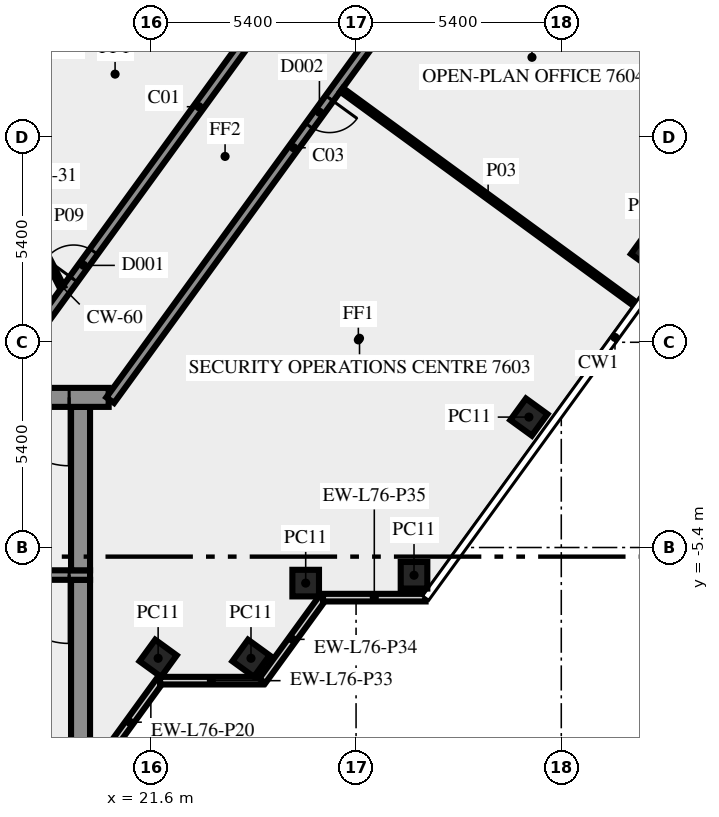
"""IFC4 building model, lengths in metres.
Left out: names, types, materials, properties, quantities, classifications, styles, units other than length and angle.
Written with IfcOpenShell. Run it as: python <this file> out.ifc"""

import sys

from ifc_helpers import new_model, si_unit, direction, frame, frame_2d, origin, origin_2d, place, context, subcontext, project, spatial, rectangle, extrude, element, fill, save


model = new_model("IFC4")
c1 = context("Model", 3, precision=1e-05, world=origin(), true_north=direction((0.0, 1.0)))
c2 = subcontext(c1, "Body", "Model", "MODEL_VIEW")
j1 = project(units=[si_unit("LENGTHUNIT", "METRE"), si_unit("PLANEANGLEUNIT", "RADIAN")], contexts=[c1])
p1 = place(None, origin())
s1 = spatial("IfcSite", under=j1, at=p1, CompositionType="ELEMENT")
p2 = place(p1, origin())
s2 = spatial("IfcBuilding", under=s1, at=p2, CompositionType="ELEMENT")
p3 = place(p2, frame((0.0, 0.0, 327.0)))
s3 = spatial("IfcBuildingStorey", under=s2, at=p3, CompositionType="ELEMENT", Elevation=327.0)
for number, where, z_axis, x_axis in (
    (1, (21.792, -8.315, 0.0), (0.0, 0.0, 1.0), (0.588, 0.809, 0.0)),
    (2, (24.235, -8.315, 0.0), (0.0, 0.0, 1.0), (0.588, 0.809, 0.0)),
    (3, (25.674, -6.337, 0.0), (0.0, 0.0, 1.0), (1.0, 0.0, 0.0)),
    (4, (28.525, -6.13, 0.0), (0.0, 0.0, 1.0), (1.0, 0.0, 0.0)),
    (5, (31.548, -1.969, 0.0), (0.0, 0.0, 1.0), (0.588, 0.809, 0.0)),
    (6, (34.722, 2.4, 0.0), (0.0, 0.0, 1.0), (0.588, 0.809, 0.0)),
):
    element("IfcColumn", number, at=place(p3, frame(where, z_axis=z_axis, x_axis=x_axis)), inside=s3, PredefinedType="COLUMN", context=c2, shape_type="SweptSolid", body=[
        extrude(rectangle(XDim=0.7, YDim=0.7, at=origin_2d()), origin(), (0.0, 0.0, 1.0), 3.65),
    ])
p4 = place(p3, frame((20.253, -11.083, 0.0), z_axis=(0.0, 0.0, 1.0), x_axis=(0.587766567315, 0.809030569476, 0.0)))
e7 = element("IfcWall", 7, at=p4, inside=s3, PredefinedType="SOLIDWALL", context=c2, shape_type="SweptSolid", body=[
    extrude(rectangle(XDim=2.688, YDim=0.2, at=frame_2d((1.344, 0.0))), origin(), (0.0, 0.0, 1.0), 3.65),
])
p5 = place(p3, frame((21.843, -8.904, 0.0), z_axis=(0.0, 0.0, 1.0), x_axis=(1.0, 0.0, 0.0)))
e8 = element("IfcWall", 8, at=p5, inside=s3, PredefinedType="SOLIDWALL", context=c2, shape_type="SweptSolid", body=[
    extrude(rectangle(XDim=2.7, YDim=0.2, at=frame_2d((1.35, 0.0))), origin(), (0.0, 0.0, 1.0), 3.65),
])
p6 = place(p3, frame((24.533, -8.909, 0.0), z_axis=(0.0, 0.0, 1.0), x_axis=(0.587720002413, 0.809064397168, 0.0)))
e9 = element("IfcWall", 9, at=p6, inside=s3, PredefinedType="SOLIDWALL", context=c2, shape_type="SweptSolid", body=[
    extrude(rectangle(XDim=2.7, YDim=0.2, at=frame_2d((1.35, 0.0))), origin(), (0.0, 0.0, 1.0), 3.65),
])
p7 = place(p3, frame((26.13, -6.719, 0.0), z_axis=(0.0, 0.0, 1.0), x_axis=(1.0, 0.0, 0.0)))
e10 = element("IfcWall", 10, at=p7, inside=s3, PredefinedType="SOLIDWALL", context=c2, shape_type="SweptSolid", body=[
    extrude(rectangle(XDim=2.7, YDim=0.2, at=frame_2d((1.35, 0.0))), origin(), (0.0, 0.0, 1.0), 3.65),
])
p8 = place(p3, frame((19.75, -10.5, 0.0), z_axis=(0.0, 0.0, 1.0), x_axis=(0.0, 1.0, 0.0)))
e11 = element("IfcWall", 11, at=p8, inside=s3, PredefinedType="SHEAR", context=c2, shape_type="SweptSolid", body=[
    extrude(rectangle(XDim=4.25, YDim=0.5, at=frame_2d((2.125, 0.0))), origin(), (0.0, 0.0, 1.0), 3.65),
])
p9 = place(p3, frame((20.0, -6.125, 0.0), z_axis=(0.0, 0.0, 1.0), x_axis=(-1.0, 0.0, 0.0)))
e12 = element("IfcWall", 12, at=p9, inside=s3, PredefinedType="SHEAR", context=c2, shape_type="SweptSolid", body=[
    extrude(rectangle(XDim=10.8, YDim=0.25, at=frame_2d((5.4, 0.0))), origin(), (0.0, 0.0, 1.0), 3.65),
])
p10 = place(p9, frame((0.55, 0.0, 0.0)))
e13 = element("IfcOpeningElement", 13, at=p10, cuts=e12, PredefinedType="OPENING", context=c2, shape_type="SweptSolid", body=[
    extrude(rectangle(XDim=1.8, YDim=2.1, at=frame_2d((0.9, 1.05))), frame((0.0, 0.135, 0.0), z_axis=(0.0, -1.0, 0.0), x_axis=(1.0, 0.0, 0.0)), (0.0, 0.0, 1.0), 0.27),
])
p11 = place(p3, frame((19.75, -6.0, 0.0), z_axis=(0.0, 0.0, 1.0), x_axis=(0.0, 1.0, 0.0)))
e14 = element("IfcWall", 14, at=p11, inside=s3, PredefinedType="SHEAR", context=c2, shape_type="SweptSolid", body=[
    extrude(rectangle(XDim=4.3, YDim=0.5, at=frame_2d((2.15, 0.0))), origin(), (0.0, 0.0, 1.0), 3.65),
])
p12 = place(p3, frame((20.49, -1.45, 0.0), z_axis=(0.0, 0.0, 1.0), x_axis=(-1.0, 0.0, 0.0)))
e15 = element("IfcWall", 15, at=p12, inside=s3, PredefinedType="SHEAR", context=c2, shape_type="SweptSolid", body=[
    extrude(rectangle(XDim=40.98, YDim=0.5, at=frame_2d((20.49, 0.0))), origin(), (0.0, 0.0, 1.0), 3.65),
])
p13 = place(p12, frame((38.14, 0.0, 0.0)))
e16 = element("IfcOpeningElement", 16, at=p13, cuts=e15, PredefinedType="OPENING", context=c2, shape_type="SweptSolid", body=[
    extrude(rectangle(XDim=1.8, YDim=2.1, at=frame_2d((0.9, 1.05))), frame((0.0, 0.26, 0.0), z_axis=(0.0, -1.0, 0.0), x_axis=(1.0, 0.0, 0.0)), (0.0, 0.0, 1.0), 0.52),
])
p14 = place(p12, frame((35.89, 0.0, 0.0)))
e17 = element("IfcOpeningElement", 17, at=p14, cuts=e15, PredefinedType="OPENING", context=c2, shape_type="SweptSolid", body=[
    extrude(rectangle(XDim=0.9, YDim=2.1, at=frame_2d((0.45, 1.05))), frame((0.0, 0.26, 0.0), z_axis=(0.0, -1.0, 0.0), x_axis=(1.0, 0.0, 0.0)), (0.0, 0.0, 1.0), 0.52),
])
p15 = place(p12, frame((32.94, 0.0, 0.0)))
e18 = element("IfcOpeningElement", 18, at=p15, cuts=e15, PredefinedType="OPENING", context=c2, shape_type="SweptSolid", body=[
    extrude(rectangle(XDim=0.9, YDim=2.1, at=frame_2d((0.45, 1.05))), frame((0.0, 0.26, 0.0), z_axis=(0.0, -1.0, 0.0), x_axis=(1.0, 0.0, 0.0)), (0.0, 0.0, 1.0), 0.52),
])
p16 = place(p12, frame((31.015, 0.0, 0.0)))
e19 = element("IfcOpeningElement", 19, at=p16, cuts=e15, PredefinedType="OPENING", context=c2, shape_type="SweptSolid", body=[
    extrude(rectangle(XDim=0.8, YDim=2.1, at=frame_2d((0.4, 1.05))), frame((0.0, 0.26, 0.0), z_axis=(0.0, -1.0, 0.0), x_axis=(1.0, 0.0, 0.0)), (0.0, 0.0, 1.0), 0.52),
])
p17 = place(p12, frame((24.765, 0.0, 0.0)))
e20 = element("IfcOpeningElement", 20, at=p17, cuts=e15, PredefinedType="OPENING", context=c2, shape_type="SweptSolid", body=[
    extrude(rectangle(XDim=0.8, YDim=2.1, at=frame_2d((0.4, 1.05))), frame((0.0, 0.26, 0.0), z_axis=(0.0, -1.0, 0.0), x_axis=(1.0, 0.0, 0.0)), (0.0, 0.0, 1.0), 0.52),
])
p18 = place(p12, frame((21.765, 0.0, 0.0)))
e21 = element("IfcOpeningElement", 21, at=p18, cuts=e15, PredefinedType="OPENING", context=c2, shape_type="SweptSolid", body=[
    extrude(rectangle(XDim=2.0, YDim=2.1, at=frame_2d((1.0, 1.05))), frame((0.0, 0.26, 0.0), z_axis=(0.0, -1.0, 0.0), x_axis=(1.0, 0.0, 0.0)), (0.0, 0.0, 1.0), 0.52),
])
p19 = place(p12, frame((15.103, 0.0, 0.0)))
e22 = element("IfcOpeningElement", 22, at=p19, cuts=e15, PredefinedType="OPENING", context=c2, shape_type="SweptSolid", body=[
    extrude(rectangle(XDim=0.9, YDim=2.1, at=frame_2d((0.45, 1.05))), frame((0.0, 0.26, 0.0), z_axis=(0.0, -1.0, 0.0), x_axis=(1.0, 0.0, 0.0)), (0.0, 0.0, 1.0), 0.52),
])
p20 = place(p12, frame((13.04, 0.0, 0.0)))
e23 = element("IfcOpeningElement", 23, at=p20, cuts=e15, PredefinedType="OPENING", context=c2, shape_type="SweptSolid", body=[
    extrude(rectangle(XDim=0.9, YDim=2.1, at=frame_2d((0.45, 1.05))), frame((0.0, 0.26, 0.0), z_axis=(0.0, -1.0, 0.0), x_axis=(1.0, 0.0, 0.0)), (0.0, 0.0, 1.0), 0.52),
])
p21 = place(p12, frame((10.177, 0.0, 0.0)))
e24 = element("IfcOpeningElement", 24, at=p21, cuts=e15, PredefinedType="OPENING", context=c2, shape_type="SweptSolid", body=[
    extrude(rectangle(XDim=0.9, YDim=2.1, at=frame_2d((0.45, 1.05))), frame((0.0, 0.26, 0.0), z_axis=(0.0, -1.0, 0.0), x_axis=(1.0, 0.0, 0.0)), (0.0, 0.0, 1.0), 0.52),
])
p22 = place(p12, frame((7.14, 0.0, 0.0)))
e25 = element("IfcOpeningElement", 25, at=p22, cuts=e15, PredefinedType="OPENING", context=c2, shape_type="SweptSolid", body=[
    extrude(rectangle(XDim=0.9, YDim=2.1, at=frame_2d((0.45, 1.05))), frame((0.0, 0.26, 0.0), z_axis=(0.0, -1.0, 0.0), x_axis=(1.0, 0.0, 0.0)), (0.0, 0.0, 1.0), 0.52),
])
p23 = place(p12, frame((5.028, 0.0, 0.0)))
e26 = element("IfcOpeningElement", 26, at=p23, cuts=e15, PredefinedType="OPENING", context=c2, shape_type="SweptSolid", body=[
    extrude(rectangle(XDim=0.8, YDim=2.1, at=frame_2d((0.4, 1.05))), frame((0.0, 0.26, 0.0), z_axis=(0.0, -1.0, 0.0), x_axis=(1.0, 0.0, 0.0)), (0.0, 0.0, 1.0), 0.52),
])
p24 = place(p12, frame((3.452, 0.0, 0.0)))
e27 = element("IfcOpeningElement", 27, at=p24, cuts=e15, PredefinedType="OPENING", context=c2, shape_type="SweptSolid", body=[
    extrude(rectangle(XDim=0.8, YDim=2.1, at=frame_2d((0.4, 1.05))), frame((0.0, 0.26, 0.0), z_axis=(0.0, -1.0, 0.0), x_axis=(1.0, 0.0, 0.0)), (0.0, 0.0, 1.0), 0.52),
])
p25 = place(p12, frame((1.04, 0.0, 0.0)))
e28 = element("IfcOpeningElement", 28, at=p25, cuts=e15, PredefinedType="OPENING", context=c2, shape_type="SweptSolid", body=[
    extrude(rectangle(XDim=1.8, YDim=2.1, at=frame_2d((0.9, 1.05))), frame((0.0, 0.26, 0.0), z_axis=(0.0, -1.0, 0.0), x_axis=(1.0, 0.0, 0.0)), (0.0, 0.0, 1.0), 0.52),
])
p26 = place(p3, frame((17.545, -1.125, 0.0), z_axis=(0.0, 0.0, 1.0), x_axis=(0.58779555165, 0.809009511354, 0.0)))
e29 = element("IfcWall", 29, at=p26, inside=s3, PredefinedType="SOLIDWALL", context=c2, shape_type="SweptSolid", body=[
    extrude(rectangle(XDim=18.103, YDim=0.25, at=frame_2d((9.052, 0.0))), origin(), (0.0, 0.0, 1.0), 3.65),
])
p27 = place(p26, frame((3.441, 0.0, 0.0)))
e30 = element("IfcOpeningElement", 30, at=p27, cuts=e29, PredefinedType="OPENING", context=c2, shape_type="SweptSolid", body=[
    extrude(rectangle(XDim=0.9, YDim=2.1, at=frame_2d((0.45, 1.05))), frame((0.0, 0.135, 0.0), z_axis=(0.0, -1.0, 0.0), x_axis=(1.0, 0.0, 0.0)), (0.0, 0.0, 1.0), 0.27),
])
p28 = place(p3, frame((30.183, 11.761, 0.0), z_axis=(0.0, 0.0, 1.0), x_axis=(-0.587781762867, -0.80901952958, 0.0)))
e31 = element("IfcWall", 31, at=p28, inside=s3, PredefinedType="SOLIDWALL", context=c2, shape_type="SweptSolid", body=[
    extrude(rectangle(XDim=16.42, YDim=0.25, at=frame_2d((8.21, 0.0))), origin(), (0.0, 0.0, 1.0), 3.65),
])
p29 = place(p28, frame((0.225, 0.0, 0.0)))
e32 = element("IfcOpeningElement", 32, at=p29, cuts=e31, PredefinedType="OPENING", context=c2, shape_type="SweptSolid", body=[
    extrude(rectangle(XDim=0.9, YDim=2.1, at=frame_2d((0.45, 1.05))), frame((0.0, 0.135, 0.0), z_axis=(0.0, -1.0, 0.0), x_axis=(1.0, 0.0, 0.0)), (0.0, 0.0, 1.0), 0.27),
])
p30 = place(p28, frame((6.605, 0.0, 0.0)))
e33 = element("IfcOpeningElement", 33, at=p30, cuts=e31, PredefinedType="OPENING", context=c2, shape_type="SweptSolid", body=[
    extrude(rectangle(XDim=0.9, YDim=2.1, at=frame_2d((0.45, 1.05))), frame((0.0, 0.135, 0.0), z_axis=(0.0, -1.0, 0.0), x_axis=(1.0, 0.0, 0.0)), (0.0, 0.0, 1.0), 0.27),
])
p31 = place(p3, frame((37.458, 6.76, 0.0), z_axis=(0.0, 0.0, 1.0), x_axis=(-0.809016295501, 0.587786214209, 0.0)))
e34 = element("IfcWall", 34, at=p31, inside=s3, PredefinedType="PARTITIONING", context=c2, shape_type="SweptSolid", body=[
    extrude(rectangle(XDim=8.7, YDim=0.12, at=frame_2d((4.35, 0.0))), origin(), (0.0, 0.0, 1.0), 3.65),
])
p32 = place(p3, frame((26.619, 6.643, 0.0), z_axis=(0.0, 0.0, 1.0), x_axis=(0.807594822539, -0.589737740532, 0.0)))
e35 = element("IfcWall", 35, at=p32, inside=s3, PredefinedType="PARTITIONING", context=c2, shape_type="SweptSolid", body=[
    extrude(rectangle(XDim=9.55, YDim=0.12, at=frame_2d((4.775, 0.0))), origin(), (0.0, 0.0, 1.0), 2.95),
])
p33 = place(p3, frame((18.0, 3.925, 0.0), z_axis=(0.0, 0.0, 1.0), x_axis=(0.453950796792, -0.891026752736, 0.0)))
e36 = element("IfcWall", 36, at=p33, inside=s3, PredefinedType="PARTITIONING", context=c2, shape_type="SweptSolid", body=[
    extrude(rectangle(XDim=2.778, YDim=0.12, at=frame_2d((1.389, 0.0))), origin(), (0.0, 0.0, 1.0), 3.65),
])
p34 = place(p10, origin())
e37 = element("IfcDoor", 37, at=p34, inside=s3, OperationType="DOUBLE_DOOR_SINGLE_SWING", PredefinedType="DOOR", context=c2, shape_type="SweptSolid", body=[
    extrude(rectangle(XDim=1.8, YDim=2.1, at=frame_2d((0.9, 1.05))), frame((0.0, 0.025, 0.0), z_axis=(0.0, -1.0, 0.0), x_axis=(1.0, 0.0, 0.0)), (0.0, 0.0, 1.0), 0.05),
])
fill(e13, e37)
p35 = place(p25, origin())
e38 = element("IfcDoor", 38, at=p35, inside=s3, OperationType="DOUBLE_DOOR_SINGLE_SWING", PredefinedType="DOOR", context=c2, shape_type="SweptSolid", body=[
    extrude(rectangle(XDim=1.8, YDim=2.1, at=frame_2d((0.9, 1.05))), frame((0.0, 0.025, 0.0), z_axis=(0.0, -1.0, 0.0), x_axis=(1.0, 0.0, 0.0)), (0.0, 0.0, 1.0), 0.05),
])
fill(e28, e38)
p36 = place(p27, origin())
e39 = element("IfcDoor", 39, at=p36, inside=s3, OperationType="SINGLE_SWING_LEFT", PredefinedType="DOOR", context=c2, shape_type="SweptSolid", body=[
    extrude(rectangle(XDim=0.9, YDim=2.1, at=frame_2d((0.45, 1.05))), frame((0.0, 0.025, 0.0), z_axis=(0.0, -1.0, 0.0), x_axis=(1.0, 0.0, 0.0)), (0.0, 0.0, 1.0), 0.05),
])
fill(e30, e39)
p37 = place(p30, origin())
e40 = element("IfcDoor", 40, at=p37, inside=s3, OperationType="SINGLE_SWING_LEFT", PredefinedType="DOOR", context=c2, shape_type="SweptSolid", body=[
    extrude(rectangle(XDim=0.9, YDim=2.1, at=frame_2d((0.45, 1.05))), frame((0.0, 0.025, 0.0), z_axis=(0.0, -1.0, 0.0), x_axis=(1.0, 0.0, 0.0)), (0.0, 0.0, 1.0), 0.05),
])
fill(e33, e40)
save(model, sys.argv[1])
